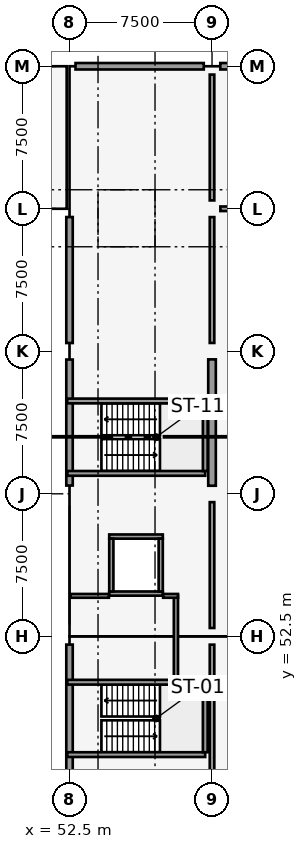
"""IFC4 building model, lengths in metres.
Left out: names, types, materials, properties, quantities, classifications, styles, units other than length and angle.
Written with IfcOpenShell. Run it as: python <this file> out.ifc"""

import sys

from ifc_helpers import new_model, si_unit, direction, frame, frame_2d, origin, origin_2d, place, context, subcontext, project, spatial, rectangle, extrude, element, fill, save


model = new_model("IFC4")
c1 = context("Model", 3, precision=1e-05, world=origin(), true_north=direction((0.0, 1.0)))
c2 = subcontext(c1, "Body", "Model", "MODEL_VIEW")
j1 = project(units=[si_unit("LENGTHUNIT", "METRE"), si_unit("PLANEANGLEUNIT", "RADIAN")], contexts=[c1])
p1 = place(None, origin())
s1 = spatial("IfcSite", under=j1, at=p1, CompositionType="ELEMENT")
p2 = place(p1, origin())
s2 = spatial("IfcBuilding", under=s1, at=p2, CompositionType="ELEMENT")
p3 = place(p2, frame((0.0, 0.0, 4.8)))
s3 = spatial("IfcBuildingStorey", under=s2, at=p3, CompositionType="ELEMENT", Elevation=4.8)
for number, where, z_axis, x_axis in (
    (1, (52.5, 52.5, 0.0), (0.0, 0.0, 1.0), (1.0, 0.0, 0.0)),
    (2, (52.5, 60.0, 0.0), (0.0, 0.0, 1.0), (1.0, 0.0, 0.0)),
    (3, (52.5, 67.5, 0.0), (0.0, 0.0, 1.0), (1.0, 0.0, 0.0)),
    (4, (52.5, 75.0, 0.0), (0.0, 0.0, 1.0), (1.0, 0.0, 0.0)),
):
    element("IfcColumn", number, at=place(p3, frame(where, z_axis=z_axis, x_axis=x_axis)), inside=s3, PredefinedType="COLUMN", context=c2, shape_type="SweptSolid", body=[
        extrude(rectangle(XDim=0.85, YDim=0.85, at=origin_2d()), origin(), (0.0, 0.0, 1.0), 4.2),
    ])
p4 = place(p3, frame((52.5, 82.5, 0.0), z_axis=(0.0, 0.0, 1.0), x_axis=(1.0, 0.0, 0.0)))
e5 = element("IfcColumn", 5, at=p4, inside=s3, PredefinedType="COLUMN", context=c2, shape_type="SweptSolid", body=[
    extrude(rectangle(XDim=0.6, YDim=1.1, at=origin_2d()), origin(), (0.0, 0.0, 1.0), 4.2),
])
for number, where, z_axis, x_axis in (
    (6, (60.0, 52.5, 0.0), (0.0, 0.0, 1.0), (1.0, 0.0, 0.0)),
    (7, (60.0, 60.0, 0.0), (0.0, 0.0, 1.0), (1.0, 0.0, 0.0)),
    (8, (60.0, 67.5, 0.0), (0.0, 0.0, 1.0), (1.0, 0.0, 0.0)),
    (9, (60.0, 75.0, 0.0), (0.0, 0.0, 1.0), (1.0, 0.0, 0.0)),
    (10, (60.0, 82.5, 0.0), (0.0, 0.0, 1.0), (1.0, 0.0, 0.0)),
):
    element("IfcColumn", number, at=place(p3, frame(where, z_axis=z_axis, x_axis=x_axis)), inside=s3, PredefinedType="COLUMN", context=c2, shape_type="SweptSolid", body=[
        extrude(rectangle(XDim=0.85, YDim=0.85, at=origin_2d()), origin(), (0.0, 0.0, 1.0), 4.2),
    ])
p5 = place(p3, frame((52.5, 71.25, 0.0), z_axis=(0.0, 0.0, 1.0), x_axis=(1.0, 0.0, 0.0)))
e11 = element("IfcColumn", 11, at=p5, inside=s3, PredefinedType="PILASTER", context=c2, shape_type="SweptSolid", body=[
    extrude(rectangle(XDim=0.45, YDim=0.85, at=origin_2d()), origin(), (0.0, 0.0, 1.0), 4.2),
])
p6 = place(p3, frame((60.0, 60.425, 0.0), z_axis=(0.0, 0.0, 1.0), x_axis=(0.0, 1.0, 0.0)))
e12 = element("IfcWall", 12, at=p6, inside=s3, PredefinedType="SHEAR", context=c2, shape_type="SweptSolid", body=[
    extrude(rectangle(XDim=6.65, YDim=0.4, at=frame_2d((3.325, 0.0))), origin(), (0.0, 0.0, 1.0), 2.97),
])
p7 = place(p3, frame((52.5, 45.435, 0.0), z_axis=(0.0, 0.0, 1.0), x_axis=(0.0, 1.0, 0.0)))
e13 = element("IfcWall", 13, at=p7, inside=s3, PredefinedType="SOLIDWALL", context=c2, shape_type="SweptSolid", body=[
    extrude(rectangle(XDim=6.63, YDim=0.34, at=frame_2d((3.315, 0.0))), origin(), (0.0, 0.0, 1.0), 2.84),
])
for number, where, z_axis, x_axis in (
    (14, (52.5, 60.435, 0.0), (0.0, 0.0, 1.0), (0.0, 1.0, 0.0)),
    (15, (52.5, 67.935, 0.0), (0.0, 0.0, 1.0), (0.0, 1.0, 0.0)),
):
    element("IfcWall", number, at=place(p3, frame(where, z_axis=z_axis, x_axis=x_axis)), inside=s3, PredefinedType="SOLIDWALL", context=c2, shape_type="SweptSolid", body=[
        extrude(rectangle(XDim=6.63, YDim=0.34, at=frame_2d((3.315, 0.0))), origin(), (0.0, 0.0, 1.0), 2.94),
    ])
p8 = place(p3, frame((52.815, 82.5, 0.0), z_axis=(0.0, 0.0, 1.0), x_axis=(1.0, 0.0, 0.0)))
e16 = element("IfcWall", 16, at=p8, inside=s3, PredefinedType="SOLIDWALL", context=c2, shape_type="SweptSolid", body=[
    extrude(rectangle(XDim=6.75, YDim=0.34, at=frame_2d((3.375, 0.0))), origin(), (0.0, 0.0, 1.0), 3.14),
])
p9 = place(p8, frame((2.585, 0.0, 0.6)))
e17 = element("IfcOpeningElement", 17, at=p9, cuts=e16, PredefinedType="OPENING", context=c2, shape_type="SweptSolid", body=[
    extrude(rectangle(XDim=1.7, YDim=1.8, at=frame_2d((0.85, 0.9))), frame((0.0, 0.18, 0.0), z_axis=(0.0, -1.0, 0.0), x_axis=(1.0, 0.0, 0.0)), (0.0, 0.0, 1.0), 0.36),
])
p10 = place(p3, frame((60.435, 82.5, 0.0), z_axis=(0.0, 0.0, 1.0), x_axis=(1.0, 0.0, 0.0)))
e18 = element("IfcWall", 18, at=p10, inside=s3, PredefinedType="SOLIDWALL", context=c2, shape_type="SweptSolid", body=[
    extrude(rectangle(XDim=6.63, YDim=0.34, at=frame_2d((3.315, 0.0))), origin(), (0.0, 0.0, 1.0), 3.14),
])
p11 = place(p10, frame((2.39, 0.0, 0.6)))
e19 = element("IfcOpeningElement", 19, at=p11, cuts=e18, PredefinedType="OPENING", context=c2, shape_type="SweptSolid", body=[
    extrude(rectangle(XDim=1.85, YDim=1.8, at=frame_2d((0.925, 0.9))), frame((0.0, 0.18, 0.0), z_axis=(0.0, -1.0, 0.0), x_axis=(1.0, 0.0, 0.0)), (0.0, 0.0, 1.0), 0.36),
])
p12 = place(p3, frame((52.38, 46.275, 0.0), z_axis=(0.0, 0.0, 1.0), x_axis=(1.0, 0.0, 0.0)))
e20 = element("IfcWall", 20, at=p12, inside=s3, PredefinedType="SOLIDWALL", context=c2, shape_type="SweptSolid", body=[
    extrude(rectangle(XDim=7.26, YDim=0.25, at=frame_2d((3.63, 0.0))), origin(), (0.0, 0.0, 1.0), 3.92),
])
p13 = place(p12, frame((0.62, 0.0, 0.0)))
e21 = element("IfcOpeningElement", 21, at=p13, cuts=e20, PredefinedType="OPENING", context=c2, shape_type="SweptSolid", body=[
    extrude(rectangle(XDim=1.1, YDim=2.15, at=frame_2d((0.55, 1.075))), frame((0.0, 0.135, 0.0), z_axis=(0.0, -1.0, 0.0), x_axis=(1.0, 0.0, 0.0)), (0.0, 0.0, 1.0), 0.27),
])
p14 = place(p3, frame((52.38, 50.085, 0.0), z_axis=(0.0, 0.0, 1.0), x_axis=(1.0, 0.0, 0.0)))
e22 = element("IfcWall", 22, at=p14, inside=s3, PredefinedType="SOLIDWALL", context=c2, shape_type="SweptSolid", body=[
    extrude(rectangle(XDim=7.26, YDim=0.25, at=frame_2d((3.63, 0.0))), origin(), (0.0, 0.0, 1.0), 3.92),
])
p15 = place(p14, frame((0.62, 0.0, 0.0)))
e23 = element("IfcOpeningElement", 23, at=p15, cuts=e22, PredefinedType="OPENING", context=c2, shape_type="SweptSolid", body=[
    extrude(rectangle(XDim=1.1, YDim=2.15, at=frame_2d((0.55, 1.075))), frame((0.0, 0.135, 0.0), z_axis=(0.0, -1.0, 0.0), x_axis=(1.0, 0.0, 0.0)), (0.0, 0.0, 1.0), 0.27),
])
p16 = place(p3, frame((59.645, 46.4, 0.0), z_axis=(0.0, 0.0, 1.0), x_axis=(0.0, 1.0, 0.0)))
e24 = element("IfcWall", 24, at=p16, inside=s3, PredefinedType="SOLIDWALL", context=c2, shape_type="SweptSolid", body=[
    extrude(rectangle(XDim=3.56, YDim=0.25, at=frame_2d((1.78, 0.0))), origin(), (0.0, 0.0, 1.0), 3.92),
])
p17 = place(p3, frame((52.38, 61.075, 0.0), z_axis=(0.0, 0.0, 1.0), x_axis=(1.0, 0.0, 0.0)))
e25 = element("IfcWall", 25, at=p17, inside=s3, PredefinedType="SOLIDWALL", context=c2, shape_type="SweptSolid", body=[
    extrude(rectangle(XDim=7.26, YDim=0.25, at=frame_2d((3.63, 0.0))), origin(), (0.0, 0.0, 1.0), 3.92),
])
p18 = place(p17, frame((0.62, 0.0, 0.0)))
e26 = element("IfcOpeningElement", 26, at=p18, cuts=e25, PredefinedType="OPENING", context=c2, shape_type="SweptSolid", body=[
    extrude(rectangle(XDim=1.1, YDim=2.15, at=frame_2d((0.55, 1.075))), frame((0.0, 0.135, 0.0), z_axis=(0.0, -1.0, 0.0), x_axis=(1.0, 0.0, 0.0)), (0.0, 0.0, 1.0), 0.27),
])
p19 = place(p3, frame((52.38, 64.885, 0.0), z_axis=(0.0, 0.0, 1.0), x_axis=(1.0, 0.0, 0.0)))
e27 = element("IfcWall", 27, at=p19, inside=s3, PredefinedType="SOLIDWALL", context=c2, shape_type="SweptSolid", body=[
    extrude(rectangle(XDim=7.26, YDim=0.25, at=frame_2d((3.63, 0.0))), origin(), (0.0, 0.0, 1.0), 3.92),
])
p20 = place(p19, frame((0.62, 0.0, 0.0)))
e28 = element("IfcOpeningElement", 28, at=p20, cuts=e27, PredefinedType="OPENING", context=c2, shape_type="SweptSolid", body=[
    extrude(rectangle(XDim=1.1, YDim=2.15, at=frame_2d((0.55, 1.075))), frame((0.0, 0.135, 0.0), z_axis=(0.0, -1.0, 0.0), x_axis=(1.0, 0.0, 0.0)), (0.0, 0.0, 1.0), 0.27),
])
p21 = place(p3, frame((59.645, 61.2, 0.0), z_axis=(0.0, 0.0, 1.0), x_axis=(0.0, 1.0, 0.0)))
e29 = element("IfcWall", 29, at=p21, inside=s3, PredefinedType="SOLIDWALL", context=c2, shape_type="SweptSolid", body=[
    extrude(rectangle(XDim=3.56, YDim=0.25, at=frame_2d((1.78, 0.0))), origin(), (0.0, 0.0, 1.0), 3.92),
])
p22 = place(p3, frame((54.59, 54.75, 0.0), z_axis=(0.0, 0.0, 1.0), x_axis=(1.0, 0.0, 0.0)))
e30 = element("IfcWall", 30, at=p22, inside=s3, PredefinedType="SOLIDWALL", context=c2, shape_type="SweptSolid", body=[
    extrude(rectangle(XDim=2.82, YDim=0.22, at=frame_2d((1.41, 0.0))), origin(), (0.0, 0.0, 1.0), 3.92),
])
p23 = place(p22, frame((0.86, 0.0, 0.0)))
e31 = element("IfcOpeningElement", 31, at=p23, cuts=e30, PredefinedType="OPENING", context=c2, shape_type="SweptSolid", body=[
    extrude(rectangle(XDim=1.1, YDim=2.15, at=frame_2d((0.55, 1.075))), frame((0.0, 0.12, 0.0), z_axis=(0.0, -1.0, 0.0), x_axis=(1.0, 0.0, 0.0)), (0.0, 0.0, 1.0), 0.24),
])
p24 = place(p3, frame((54.59, 57.75, 0.0), z_axis=(0.0, 0.0, 1.0), x_axis=(1.0, 0.0, 0.0)))
e32 = element("IfcWall", 32, at=p24, inside=s3, PredefinedType="SOLIDWALL", context=c2, shape_type="SweptSolid", body=[
    extrude(rectangle(XDim=2.82, YDim=0.22, at=frame_2d((1.41, 0.0))), origin(), (0.0, 0.0, 1.0), 3.92),
])
for number, where, z_axis, x_axis in (
    (33, (54.7, 54.86, 0.0), (0.0, 0.0, 1.0), (0.0, 1.0, 0.0)),
    (34, (57.3, 54.86, 0.0), (0.0, 0.0, 1.0), (0.0, 1.0, 0.0)),
):
    element("IfcWall", number, at=place(p3, frame(where, z_axis=z_axis, x_axis=x_axis)), inside=s3, PredefinedType="SOLIDWALL", context=c2, shape_type="SweptSolid", body=[
        extrude(rectangle(XDim=2.78, YDim=0.22, at=frame_2d((1.39, 0.0))), origin(), (0.0, 0.0, 1.0), 3.92),
    ])
p25 = place(p3, frame((58.1, 50.22, 0.0), z_axis=(0.0, 0.0, 1.0), x_axis=(0.0, 1.0, 0.0)))
e35 = element("IfcWall", 35, at=p25, inside=s3, PredefinedType="SOLIDWALL", context=c2, shape_type="SweptSolid", body=[
    extrude(rectangle(XDim=4.41, YDim=0.22, at=frame_2d((2.205, 0.0))), origin(), (0.0, 0.0, 1.0), 3.92),
])
p26 = place(p25, frame((0.45, 0.0, 0.0)))
e36 = element("IfcOpeningElement", 36, at=p26, cuts=e35, PredefinedType="OPENING", context=c2, shape_type="SweptSolid", body=[
    extrude(rectangle(XDim=1.1, YDim=2.15, at=frame_2d((0.55, 1.075))), frame((0.0, 0.12, 0.0), z_axis=(0.0, -1.0, 0.0), x_axis=(1.0, 0.0, 0.0)), (0.0, 0.0, 1.0), 0.24),
])
p27 = place(p3, frame((52.56, 54.63, 0.0), z_axis=(0.0, 0.0, 1.0), x_axis=(1.0, 0.0, 0.0)))
e37 = element("IfcWall", 37, at=p27, inside=s3, PredefinedType="PARTITIONING", context=c2, shape_type="SweptSolid", body=[
    extrude(rectangle(XDim=2.015, YDim=0.2, at=frame_2d((1.007, 0.0))), origin(), (0.0, 0.0, 1.0), 3.15),
])
p28 = place(p3, frame((57.425, 54.63, 0.0), z_axis=(0.0, 0.0, 1.0), x_axis=(1.0, 0.0, 0.0)))
e38 = element("IfcWall", 38, at=p28, inside=s3, PredefinedType="PARTITIONING", context=c2, shape_type="SweptSolid", body=[
    extrude(rectangle(XDim=0.785, YDim=0.2, at=frame_2d((0.393, 0.0))), origin(), (0.0, 0.0, 1.0), 3.9),
])
p29 = place(p3, frame((60.439, 75.0, 0.0), z_axis=(0.0, 0.0, 1.0), x_axis=(1.0, 0.0, 0.0)))
e39 = element("IfcWall", 39, at=p29, inside=s3, PredefinedType="PARTITIONING", context=c2, shape_type="SweptSolid", body=[
    extrude(rectangle(XDim=6.622, YDim=0.24, at=frame_2d((3.311, 0.0))), origin(), (0.0, 0.0, 1.0), 2.84),
])
p30 = place(p29, frame((1.461, 0.0, 0.0)))
e40 = element("IfcOpeningElement", 40, at=p30, cuts=e39, PredefinedType="OPENING", context=c2, shape_type="SweptSolid", body=[
    extrude(rectangle(XDim=2.2, YDim=2.18, at=frame_2d((1.1, 1.09))), frame((0.0, 0.13, 0.0), z_axis=(0.0, -1.0, 0.0), x_axis=(1.0, 0.0, 0.0)), (0.0, 0.0, 1.0), 0.26),
])
p31 = place(p3, frame((60.0, 45.439, 0.0), z_axis=(0.0, 0.0, 1.0), x_axis=(0.0, 1.0, 0.0)))
e41 = element("IfcWall", 41, at=p31, inside=s3, PredefinedType="PARTITIONING", context=c2, shape_type="SweptSolid", body=[
    extrude(rectangle(XDim=6.622, YDim=0.24, at=frame_2d((3.311, 0.0))), origin(), (0.0, 0.0, 1.0), 2.84),
])
p32 = place(p3, frame((60.0, 52.939, 0.0), z_axis=(0.0, 0.0, 1.0), x_axis=(0.0, 1.0, 0.0)))
e42 = element("IfcWall", 42, at=p32, inside=s3, PredefinedType="PARTITIONING", context=c2, shape_type="SweptSolid", body=[
    extrude(rectangle(XDim=6.622, YDim=0.24, at=frame_2d((3.311, 0.0))), origin(), (0.0, 0.0, 1.0), 2.84),
])
p33 = place(p32, frame((2.411, 0.0, 0.0)))
e43 = element("IfcOpeningElement", 43, at=p33, cuts=e42, PredefinedType="OPENING", context=c2, shape_type="SweptSolid", body=[
    extrude(rectangle(XDim=1.8, YDim=2.16, at=frame_2d((0.9, 1.08))), frame((0.0, 0.13, 0.0), z_axis=(0.0, -1.0, 0.0), x_axis=(1.0, 0.0, 0.0)), (0.0, 0.0, 1.0), 0.26),
])
p34 = place(p3, frame((60.0, 67.939, 0.0), z_axis=(0.0, 0.0, 1.0), x_axis=(0.0, 1.0, 0.0)))
e44 = element("IfcWall", 44, at=p34, inside=s3, PredefinedType="PARTITIONING", context=c2, shape_type="SweptSolid", body=[
    extrude(rectangle(XDim=6.622, YDim=0.24, at=frame_2d((3.311, 0.0))), origin(), (0.0, 0.0, 1.0), 2.84),
])
p35 = place(p34, frame((2.411, 0.0, 0.0)))
e45 = element("IfcOpeningElement", 45, at=p35, cuts=e44, PredefinedType="OPENING", context=c2, shape_type="SweptSolid", body=[
    extrude(rectangle(XDim=1.8, YDim=2.16, at=frame_2d((0.9, 1.08))), frame((0.0, 0.13, 0.0), z_axis=(0.0, -1.0, 0.0), x_axis=(1.0, 0.0, 0.0)), (0.0, 0.0, 1.0), 0.26),
])
p36 = place(p3, frame((60.0, 75.439, 0.0), z_axis=(0.0, 0.0, 1.0), x_axis=(0.0, 1.0, 0.0)))
e46 = element("IfcWall", 46, at=p36, inside=s3, PredefinedType="PARTITIONING", context=c2, shape_type="SweptSolid", body=[
    extrude(rectangle(XDim=6.622, YDim=0.24, at=frame_2d((3.311, 0.0))), origin(), (0.0, 0.0, 1.0), 2.84),
])
p37 = place(p36, frame((2.511, 0.0, 0.0)))
e47 = element("IfcOpeningElement", 47, at=p37, cuts=e46, PredefinedType="OPENING", context=c2, shape_type="SweptSolid", body=[
    extrude(rectangle(XDim=1.6, YDim=2.15, at=frame_2d((0.8, 1.075))), frame((0.0, 0.13, 0.0), z_axis=(0.0, -1.0, 0.0), x_axis=(1.0, 0.0, 0.0)), (0.0, 0.0, 1.0), 0.26),
])
p38 = place(p9, origin())
e48 = element("IfcWindow", 48, at=p38, inside=s3, PartitioningType="SINGLE_PANEL", PredefinedType="WINDOW", context=c2, shape_type="SweptSolid", body=[
    extrude(rectangle(XDim=1.7, YDim=1.8, at=frame_2d((0.85, 0.9))), frame((0.0, 0.03, 0.0), z_axis=(0.0, -1.0, 0.0), x_axis=(1.0, 0.0, 0.0)), (0.0, 0.0, 1.0), 0.06),
])
fill(e17, e48)
p39 = place(p13, origin())
e49 = element("IfcDoor", 49, at=p39, inside=s3, OperationType="SINGLE_SWING_LEFT", PredefinedType="DOOR", context=c2, shape_type="SweptSolid", body=[
    extrude(rectangle(XDim=1.1, YDim=2.15, at=frame_2d((0.55, 1.075))), frame((0.0, 0.025, 0.0), z_axis=(0.0, -1.0, 0.0), x_axis=(1.0, 0.0, 0.0)), (0.0, 0.0, 1.0), 0.05),
])
fill(e21, e49)
p40 = place(p15, frame((1.1, 0.0, 0.0), z_axis=(0.0, 0.0, 1.0), x_axis=(-1.0, 0.0, 0.0)))
e50 = element("IfcDoor", 50, at=p40, inside=s3, OperationType="SINGLE_SWING_RIGHT", PredefinedType="DOOR", context=c2, shape_type="SweptSolid", body=[
    extrude(rectangle(XDim=1.1, YDim=2.15, at=frame_2d((0.55, 1.075))), frame((0.0, 0.025, 0.0), z_axis=(0.0, -1.0, 0.0), x_axis=(1.0, 0.0, 0.0)), (0.0, 0.0, 1.0), 0.05),
])
fill(e23, e50)
p41 = place(p18, origin())
e51 = element("IfcDoor", 51, at=p41, inside=s3, OperationType="SINGLE_SWING_LEFT", PredefinedType="DOOR", context=c2, shape_type="SweptSolid", body=[
    extrude(rectangle(XDim=1.1, YDim=2.15, at=frame_2d((0.55, 1.075))), frame((0.0, 0.025, 0.0), z_axis=(0.0, -1.0, 0.0), x_axis=(1.0, 0.0, 0.0)), (0.0, 0.0, 1.0), 0.05),
])
fill(e26, e51)
p42 = place(p20, frame((1.1, 0.0, 0.0), z_axis=(0.0, 0.0, 1.0), x_axis=(-1.0, 0.0, 0.0)))
e52 = element("IfcDoor", 52, at=p42, inside=s3, OperationType="SINGLE_SWING_RIGHT", PredefinedType="DOOR", context=c2, shape_type="SweptSolid", body=[
    extrude(rectangle(XDim=1.1, YDim=2.15, at=frame_2d((0.55, 1.075))), frame((0.0, 0.025, 0.0), z_axis=(0.0, -1.0, 0.0), x_axis=(1.0, 0.0, 0.0)), (0.0, 0.0, 1.0), 0.05),
])
fill(e28, e52)
p43 = place(p23, origin())
e53 = element("IfcDoor", 53, at=p43, inside=s3, OperationType="SLIDING_TO_LEFT", PredefinedType="DOOR", context=c2, shape_type="SweptSolid", body=[
    extrude(rectangle(XDim=1.1, YDim=2.15, at=frame_2d((0.55, 1.075))), frame((0.0, 0.025, 0.0), z_axis=(0.0, -1.0, 0.0), x_axis=(1.0, 0.0, 0.0)), (0.0, 0.0, 1.0), 0.05),
])
fill(e31, e53)
p44 = place(p26, origin())
e54 = element("IfcDoor", 54, at=p44, inside=s3, OperationType="SINGLE_SWING_LEFT", PredefinedType="DOOR", context=c2, shape_type="SweptSolid", body=[
    extrude(rectangle(XDim=1.1, YDim=2.15, at=frame_2d((0.55, 1.075))), frame((0.0, 0.025, 0.0), z_axis=(0.0, -1.0, 0.0), x_axis=(1.0, 0.0, 0.0)), (0.0, 0.0, 1.0), 0.05),
])
fill(e36, e54)
p45 = place(p33, origin())
e55 = element("IfcDoor", 55, at=p45, inside=s3, OperationType="SINGLE_SWING_RIGHT", PredefinedType="DOOR", context=c2, shape_type="SweptSolid", body=[
    extrude(rectangle(XDim=1.8, YDim=2.16, at=frame_2d((0.9, 1.08))), frame((0.0, 0.025, 0.0), z_axis=(0.0, -1.0, 0.0), x_axis=(1.0, 0.0, 0.0)), (0.0, 0.0, 1.0), 0.05),
])
fill(e43, e55)
p46 = place(p35, origin())
e56 = element("IfcDoor", 56, at=p46, inside=s3, OperationType="SINGLE_SWING_LEFT", PredefinedType="DOOR", context=c2, shape_type="SweptSolid", body=[
    extrude(rectangle(XDim=1.8, YDim=2.16, at=frame_2d((0.9, 1.08))), frame((0.0, 0.025, 0.0), z_axis=(0.0, -1.0, 0.0), x_axis=(1.0, 0.0, 0.0)), (0.0, 0.0, 1.0), 0.05),
])
fill(e45, e56)
p47 = place(p37, origin())
e57 = element("IfcDoor", 57, at=p47, inside=s3, OperationType="SINGLE_SWING_RIGHT", PredefinedType="DOOR", context=c2, shape_type="SweptSolid", body=[
    extrude(rectangle(XDim=1.6, YDim=2.15, at=frame_2d((0.8, 1.075))), frame((0.0, 0.025, 0.0), z_axis=(0.0, -1.0, 0.0), x_axis=(1.0, 0.0, 0.0)), (0.0, 0.0, 1.0), 0.05),
])
fill(e47, e57)
save(model, sys.argv[1])
